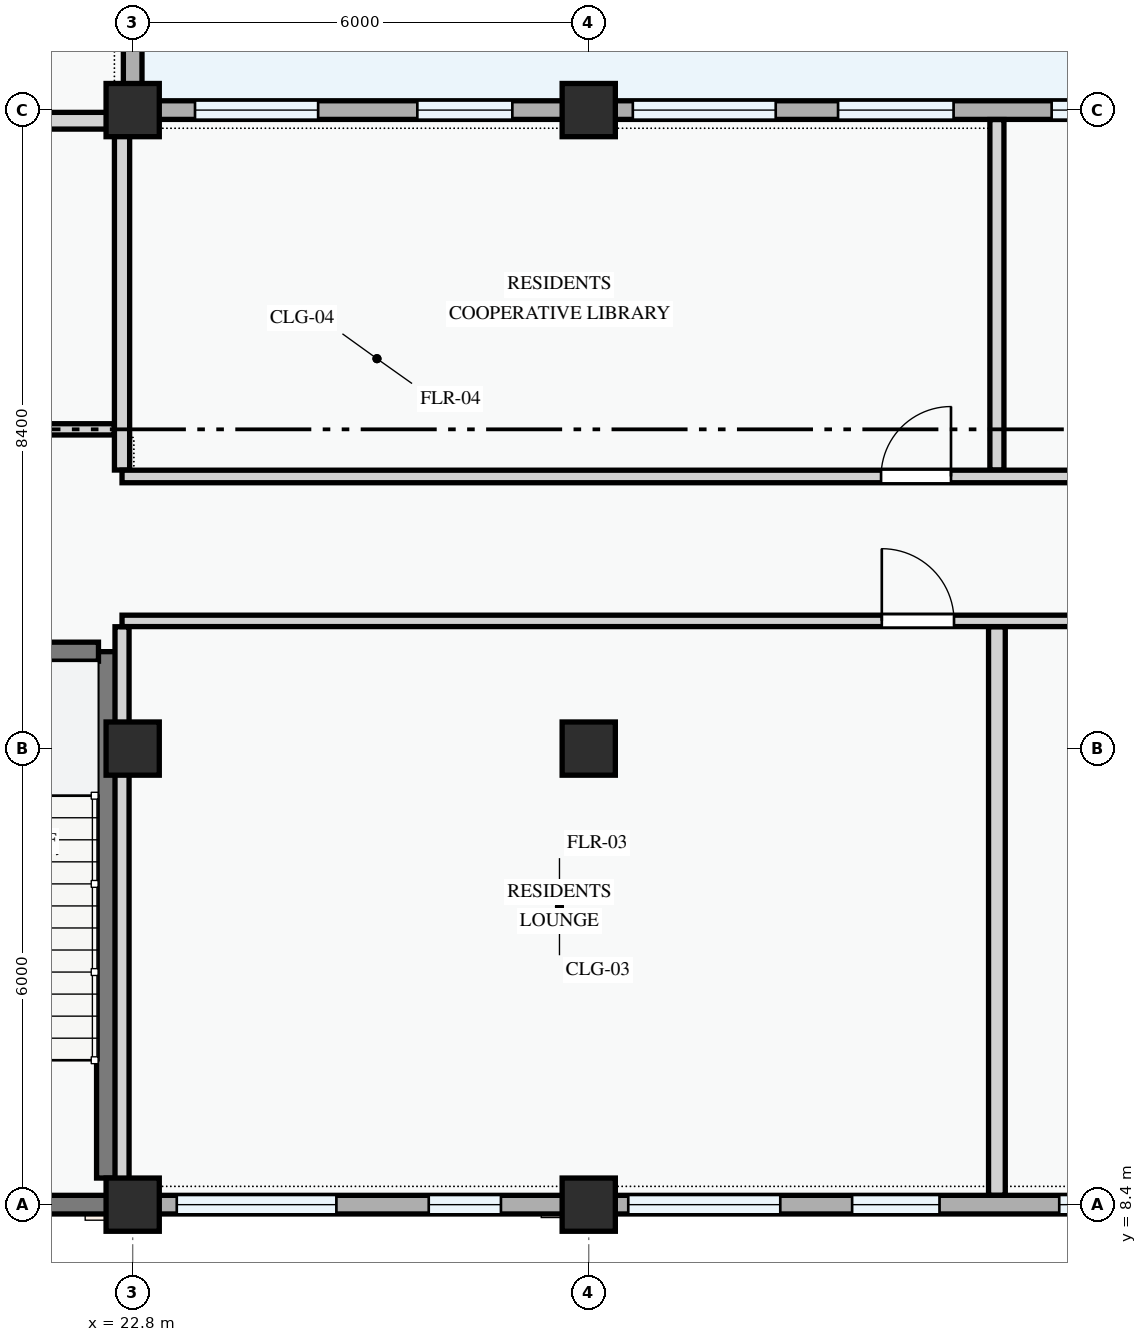
"""IFC4 building model, lengths in metres.
Left out: names, types, materials, properties, quantities, classifications, styles, units other than length and angle.
Written with IfcOpenShell. Run it as: python <this file> out.ifc"""

import sys

from ifc_helpers import new_model, si_unit, direction, frame, frame_2d, origin, origin_2d, place, context, subcontext, project, spatial, rectangle, extrude, element, fill, save


model = new_model("IFC4")
c1 = context("Model", 3, precision=1e-05, world=origin(), true_north=direction((0.0, 1.0)))
c2 = subcontext(c1, "Body", "Model", "MODEL_VIEW")
j1 = project(units=[si_unit("LENGTHUNIT", "METRE"), si_unit("PLANEANGLEUNIT", "RADIAN")], contexts=[c1])
p1 = place(None, origin())
s1 = spatial("IfcSite", under=j1, at=p1, CompositionType="ELEMENT")
p2 = place(p1, origin())
s2 = spatial("IfcBuilding", under=s1, at=p2, CompositionType="ELEMENT")
p3 = place(p2, origin())
s3 = spatial("IfcBuildingStorey", under=s2, at=p3, CompositionType="ELEMENT", Elevation=0.0)
for number, where, z_axis, x_axis in (
    (1, (22.8, 8.4, 0.0), (0.0, 0.0, 1.0), (1.0, 0.0, 0.0)),
    (2, (22.8, 14.4, 0.0), (0.0, 0.0, 1.0), (1.0, 0.0, 0.0)),
    (3, (22.8, 22.8, 0.0), (0.0, 0.0, 1.0), (1.0, 0.0, 0.0)),
    (4, (28.8, 8.4, 0.0), (0.0, 0.0, 1.0), (1.0, 0.0, 0.0)),
    (5, (28.8, 14.4, 0.0), (0.0, 0.0, 1.0), (1.0, 0.0, 0.0)),
    (6, (28.8, 22.8, 0.0), (0.0, 0.0, 1.0), (1.0, 0.0, 0.0)),
):
    element("IfcColumn", number, at=place(p3, frame(where, z_axis=z_axis, x_axis=x_axis)), inside=s3, PredefinedType="COLUMN", context=c2, shape_type="SweptSolid", body=[
        extrude(rectangle(XDim=0.7, YDim=0.7, at=origin_2d()), origin(), (0.0, 0.0, 1.0), 4.5),
    ])
p4 = place(p3, frame((22.8, 22.8, 0.0), z_axis=(0.0, 0.0, 1.0), x_axis=(0.0, 1.0, 0.0)))
e7 = element("IfcWall", 7, at=p4, inside=s3, PredefinedType="STANDARD", context=c2, shape_type="SweptSolid", body=[
    extrude(rectangle(XDim=6.0, YDim=0.245, at=frame_2d((3.0, 0.0))), origin(), (0.0, 0.0, 1.0), 3.585),
])
p5 = place(p4, frame((0.88, 0.0, 0.78)))
e8 = element("IfcOpeningElement", 8, at=p5, cuts=e7, PredefinedType="OPENING", context=c2, shape_type="SweptSolid", body=[
    extrude(rectangle(XDim=1.5, YDim=1.5, at=frame_2d((0.75, 0.75))), frame((0.0, 0.133, 0.0), z_axis=(0.0, -1.0, 0.0), x_axis=(1.0, 0.0, 0.0)), (0.0, 0.0, 1.0), 0.265),
])
p6 = place(p4, frame((3.495, 0.0, 0.78)))
e9 = element("IfcOpeningElement", 9, at=p6, cuts=e7, PredefinedType="OPENING", context=c2, shape_type="SweptSolid", body=[
    extrude(rectangle(XDim=1.75, YDim=1.45, at=frame_2d((0.875, 0.725))), frame((0.0, 0.133, 0.0), z_axis=(0.0, -1.0, 0.0), x_axis=(1.0, 0.0, 0.0)), (0.0, 0.0, 1.0), 0.265),
])
p7 = place(p3, frame((14.4, 8.4, 0.0), z_axis=(0.0, 0.0, 1.0), x_axis=(1.0, 0.0, 0.0)))
e10 = element("IfcWall", 10, at=p7, inside=s3, PredefinedType="STANDARD", context=c2, shape_type="SweptSolid", body=[
    extrude(rectangle(XDim=8.4, YDim=0.245, at=frame_2d((4.2, 0.0))), origin(), (0.0, 0.0, 1.0), 4.2),
])
p8 = place(p7, frame((0.4, 0.0, 0.0)))
e11 = element("IfcOpeningElement", 11, at=p8, cuts=e10, PredefinedType="OPENING", context=c2, shape_type="SweptSolid", body=[
    extrude(rectangle(XDim=1.6, YDim=2.35, at=frame_2d((0.8, 1.175))), frame((0.0, 0.133, 0.0), z_axis=(0.0, -1.0, 0.0), x_axis=(1.0, 0.0, 0.0)), (0.0, 0.0, 1.0), 0.265),
])
p9 = place(p7, frame((5.85, 0.0, 0.0)))
e12 = element("IfcOpeningElement", 12, at=p9, cuts=e10, PredefinedType="OPENING", context=c2, shape_type="SweptSolid", body=[
    extrude(rectangle(XDim=1.3, YDim=2.2, at=frame_2d((0.65, 1.1))), frame((0.0, 0.133, 0.0), z_axis=(0.0, -1.0, 0.0), x_axis=(1.0, 0.0, 0.0)), (0.0, 0.0, 1.0), 0.265),
])
p10 = place(p3, frame((22.8, 8.4, 0.0), z_axis=(0.0, 0.0, 1.0), x_axis=(1.0, 0.0, 0.0)))
e13 = element("IfcWall", 13, at=p10, inside=s3, PredefinedType="STANDARD", context=c2, shape_type="SweptSolid", body=[
    extrude(rectangle(XDim=6.0, YDim=0.245, at=frame_2d((3.0, 0.0))), origin(), (0.0, 0.0, 1.0), 3.585),
])
p11 = place(p10, frame((0.58, 0.0, 0.78)))
e14 = element("IfcOpeningElement", 14, at=p11, cuts=e13, PredefinedType="OPENING", context=c2, shape_type="SweptSolid", body=[
    extrude(rectangle(XDim=2.1, YDim=1.55, at=frame_2d((1.05, 0.775))), frame((0.0, 0.133, 0.0), z_axis=(0.0, -1.0, 0.0), x_axis=(1.0, 0.0, 0.0)), (0.0, 0.0, 1.0), 0.265),
])
p12 = place(p10, frame((3.895, 0.0, 0.78)))
e15 = element("IfcOpeningElement", 15, at=p12, cuts=e13, PredefinedType="OPENING", context=c2, shape_type="SweptSolid", body=[
    extrude(rectangle(XDim=0.95, YDim=1.15, at=frame_2d((0.475, 0.575))), frame((0.0, 0.133, 0.0), z_axis=(0.0, -1.0, 0.0), x_axis=(1.0, 0.0, 0.0)), (0.0, 0.0, 1.0), 0.265),
])
p13 = place(p3, frame((28.8, 8.4, 0.0), z_axis=(0.0, 0.0, 1.0), x_axis=(1.0, 0.0, 0.0)))
e16 = element("IfcWall", 16, at=p13, inside=s3, PredefinedType="STANDARD", context=c2, shape_type="SweptSolid", body=[
    extrude(rectangle(XDim=8.4, YDim=0.245, at=frame_2d((4.2, 0.0))), origin(), (0.0, 0.0, 1.0), 3.485),
])
p14 = place(p13, frame((0.52, 0.0, 0.78)))
e17 = element("IfcOpeningElement", 17, at=p14, cuts=e16, PredefinedType="OPENING", context=c2, shape_type="SweptSolid", body=[
    extrude(rectangle(XDim=2.0, YDim=1.5, at=frame_2d((1.0, 0.75))), frame((0.0, 0.133, 0.0), z_axis=(0.0, -1.0, 0.0), x_axis=(1.0, 0.0, 0.0)), (0.0, 0.0, 1.0), 0.265),
])
p15 = place(p13, frame((3.465, 0.0, 0.78)))
e18 = element("IfcOpeningElement", 18, at=p15, cuts=e16, PredefinedType="OPENING", context=c2, shape_type="SweptSolid", body=[
    extrude(rectangle(XDim=1.15, YDim=1.25, at=frame_2d((0.575, 0.625))), frame((0.0, 0.133, 0.0), z_axis=(0.0, -1.0, 0.0), x_axis=(1.0, 0.0, 0.0)), (0.0, 0.0, 1.0), 0.265),
])
p16 = place(p13, frame((6.19, 0.0, 0.78)))
e19 = element("IfcOpeningElement", 19, at=p16, cuts=e16, PredefinedType="OPENING", context=c2, shape_type="SweptSolid", body=[
    extrude(rectangle(XDim=1.2, YDim=1.35, at=frame_2d((0.6, 0.675))), frame((0.0, 0.133, 0.0), z_axis=(0.0, -1.0, 0.0), x_axis=(1.0, 0.0, 0.0)), (0.0, 0.0, 1.0), 0.265),
])
p17 = place(p3, frame((37.2, 22.8, 0.0), z_axis=(0.0, 0.0, 1.0), x_axis=(-1.0, 0.0, 0.0)))
e20 = element("IfcWall", 20, at=p17, inside=s3, PredefinedType="STANDARD", context=c2, shape_type="SweptSolid", body=[
    extrude(rectangle(XDim=8.4, YDim=0.245, at=frame_2d((4.2, 0.0))), origin(), (0.0, 0.0, 1.0), 3.485),
])
p18 = place(p17, frame((0.91, 0.0, 0.78)))
e21 = element("IfcOpeningElement", 21, at=p18, cuts=e20, PredefinedType="OPENING", context=c2, shape_type="SweptSolid", body=[
    extrude(rectangle(XDim=1.4, YDim=1.45, at=frame_2d((0.7, 0.725))), frame((0.0, 0.133, 0.0), z_axis=(0.0, -1.0, 0.0), x_axis=(1.0, 0.0, 0.0)), (0.0, 0.0, 1.0), 0.265),
])
p19 = place(p17, frame((3.6, 0.0, 0.78)))
e22 = element("IfcOpeningElement", 22, at=p19, cuts=e20, PredefinedType="OPENING", context=c2, shape_type="SweptSolid", body=[
    extrude(rectangle(XDim=1.52, YDim=1.42, at=frame_2d((0.76, 0.71))), frame((0.0, 0.133, 0.0), z_axis=(0.0, -1.0, 0.0), x_axis=(1.0, 0.0, 0.0)), (0.0, 0.0, 1.0), 0.265),
])
p20 = place(p17, frame((5.94, 0.0, 0.78)))
e23 = element("IfcOpeningElement", 23, at=p20, cuts=e20, PredefinedType="OPENING", context=c2, shape_type="SweptSolid", body=[
    extrude(rectangle(XDim=1.88, YDim=1.52, at=frame_2d((0.94, 0.76))), frame((0.0, 0.133, 0.0), z_axis=(0.0, -1.0, 0.0), x_axis=(1.0, 0.0, 0.0)), (0.0, 0.0, 1.0), 0.265),
])
p21 = place(p3, frame((28.8, 22.8, 0.0), z_axis=(0.0, 0.0, 1.0), x_axis=(-1.0, 0.0, 0.0)))
e24 = element("IfcWall", 24, at=p21, inside=s3, PredefinedType="STANDARD", context=c2, shape_type="SweptSolid", body=[
    extrude(rectangle(XDim=6.0, YDim=0.245, at=frame_2d((3.0, 0.0))), origin(), (0.0, 0.0, 1.0), 3.585),
])
p22 = place(p21, frame((1.005, 0.0, 0.78)))
e25 = element("IfcOpeningElement", 25, at=p22, cuts=e24, PredefinedType="OPENING", context=c2, shape_type="SweptSolid", body=[
    extrude(rectangle(XDim=1.25, YDim=1.45, at=frame_2d((0.625, 0.725))), frame((0.0, 0.133, 0.0), z_axis=(0.0, -1.0, 0.0), x_axis=(1.0, 0.0, 0.0)), (0.0, 0.0, 1.0), 0.265),
])
p23 = place(p21, frame((3.56, 0.0, 0.78)))
e26 = element("IfcOpeningElement", 26, at=p23, cuts=e24, PredefinedType="OPENING", context=c2, shape_type="SweptSolid", body=[
    extrude(rectangle(XDim=1.62, YDim=1.38, at=frame_2d((0.81, 0.69))), frame((0.0, 0.133, 0.0), z_axis=(0.0, -1.0, 0.0), x_axis=(1.0, 0.0, 0.0)), (0.0, 0.0, 1.0), 0.265),
])
p24 = place(p3, frame((22.475, 8.75, 0.0), z_axis=(0.0, 0.0, 1.0), x_axis=(0.0, 1.0, 0.0)))
e27 = element("IfcWall", 27, at=p24, inside=s3, PredefinedType="SHEAR", context=c2, shape_type="SweptSolid", body=[
    extrude(rectangle(XDim=6.925, YDim=0.3, at=frame_2d((3.462, 0.0))), origin(), (0.0, 0.0, 1.0), 4.2),
])
p25 = place(p3, frame((8.85, 15.675, 0.0), z_axis=(0.0, 0.0, 1.0), x_axis=(1.0, 0.0, 0.0)))
e28 = element("IfcWall", 28, at=p25, inside=s3, PredefinedType="SHEAR", context=c2, shape_type="SweptSolid", body=[
    extrude(rectangle(XDim=13.5, YDim=0.25, at=frame_2d((6.75, 0.0))), origin(), (0.0, 0.0, 1.0), 4.2),
])
p26 = place(p25, frame((6.2, 0.0, 0.0)))
e29 = element("IfcOpeningElement", 29, at=p26, cuts=e28, PredefinedType="OPENING", context=c2, shape_type="SweptSolid", body=[
    extrude(rectangle(XDim=1.1, YDim=2.15, at=frame_2d((0.55, 1.075))), frame((0.0, 0.135, 0.0), z_axis=(0.0, -1.0, 0.0), x_axis=(1.0, 0.0, 0.0)), (0.0, 0.0, 1.0), 0.27),
])
p27 = place(p3, frame((18.025, 18.6, 0.0), z_axis=(0.0, 0.0, 1.0), x_axis=(1.0, 0.0, 0.0)))
e30 = element("IfcWall", 30, at=p27, inside=s3, PredefinedType="PARTITIONING", context=c2, shape_type="SweptSolid", body=[
    extrude(rectangle(XDim=4.533, YDim=0.148, at=frame_2d((2.267, 0.0))), origin(), (0.0, 0.0, 1.0), 4.2),
])
p28 = place(p27, frame((1.65, 0.0, 0.0)))
e31 = element("IfcOpeningElement", 31, at=p28, cuts=e30, PredefinedType="OPENING", context=c2, shape_type="SweptSolid", body=[
    extrude(rectangle(XDim=1.0, YDim=2.15, at=frame_2d((0.5, 1.075))), frame((0.0, 0.084, 0.0), z_axis=(0.0, -1.0, 0.0), x_axis=(1.0, 0.0, 0.0)), (0.0, 0.0, 1.0), 0.168),
])
p29 = place(p3, frame((18.064, 22.66, 0.0), z_axis=(0.0, 0.0, 1.0), x_axis=(1.0, 0.0, 0.0)))
e32 = element("IfcWall", 32, at=p29, inside=s3, PredefinedType="PARTITIONING", context=c2, shape_type="SweptSolid", body=[
    extrude(rectangle(XDim=4.494, YDim=0.22, at=frame_2d((2.247, 0.0))), origin(), (0.0, 0.0, 1.0), 3.485),
])
p30 = place(p3, frame((22.66, 8.524, 0.0), z_axis=(0.0, 0.0, 1.0), x_axis=(0.0, 1.0, 0.0)))
e33 = element("IfcWall", 33, at=p30, inside=s3, PredefinedType="PARTITIONING", context=c2, shape_type="SweptSolid", body=[
    extrude(rectangle(XDim=7.479, YDim=0.185, at=frame_2d((3.739, 0.0))), origin(), (0.0, 0.0, 1.0), 3.485),
])
p31 = place(p3, frame((22.66, 18.064, 0.0), z_axis=(0.0, 0.0, 1.0), x_axis=(0.0, 1.0, 0.0)))
e34 = element("IfcWall", 34, at=p31, inside=s3, PredefinedType="PARTITIONING", context=c2, shape_type="SweptSolid", body=[
    extrude(rectangle(XDim=4.676, YDim=0.2, at=frame_2d((2.338, 0.0))), origin(), (0.0, 0.0, 1.0), 3.485),
])
p32 = place(p3, frame((34.17, 8.524, 0.0), z_axis=(0.0, 0.0, 1.0), x_axis=(0.0, 1.0, 0.0)))
e35 = element("IfcWall", 35, at=p32, inside=s3, PredefinedType="PARTITIONING", context=c2, shape_type="SweptSolid", body=[
    extrude(rectangle(XDim=7.479, YDim=0.22, at=frame_2d((3.739, 0.0))), origin(), (0.0, 0.0, 1.0), 4.2),
])
p33 = place(p3, frame((34.17, 18.064, 0.0), z_axis=(0.0, 0.0, 1.0), x_axis=(0.0, 1.0, 0.0)))
e36 = element("IfcWall", 36, at=p33, inside=s3, PredefinedType="PARTITIONING", context=c2, shape_type="SweptSolid", body=[
    extrude(rectangle(XDim=4.611, YDim=0.185, at=frame_2d((2.306, 0.0))), origin(), (0.0, 0.0, 1.0), 4.2),
])
p34 = place(p3, frame((22.66, 16.08, 0.0), z_axis=(0.0, 0.0, 1.0), x_axis=(1.0, 0.0, 0.0)))
e37 = element("IfcWall", 37, at=p34, inside=s3, PredefinedType="PARTITIONING", context=c2, shape_type="SweptSolid", body=[
    extrude(rectangle(XDim=34.816, YDim=0.15, at=frame_2d((17.408, 0.0))), origin(), (0.0, 0.0, 1.0), 4.2),
])
p35 = place(p34, frame((9.996, 0.0, 0.0)))
e38 = element("IfcOpeningElement", 38, at=p35, cuts=e37, PredefinedType="OPENING", context=c2, shape_type="SweptSolid", body=[
    extrude(rectangle(XDim=0.95, YDim=2.1, at=frame_2d((0.475, 1.05))), frame((0.0, 0.085, 0.0), z_axis=(0.0, -1.0, 0.0), x_axis=(1.0, 0.0, 0.0)), (0.0, 0.0, 1.0), 0.17),
])
p36 = place(p34, frame((16.965, 0.0, 0.0)))
e39 = element("IfcOpeningElement", 39, at=p36, cuts=e37, PredefinedType="OPENING", context=c2, shape_type="SweptSolid", body=[
    extrude(rectangle(XDim=0.95, YDim=2.1, at=frame_2d((0.475, 1.05))), frame((0.0, 0.085, 0.0), z_axis=(0.0, -1.0, 0.0), x_axis=(1.0, 0.0, 0.0)), (0.0, 0.0, 1.0), 0.17),
])
p37 = place(p34, frame((24.249, 0.0, 0.0)))
e40 = element("IfcOpeningElement", 40, at=p37, cuts=e37, PredefinedType="OPENING", context=c2, shape_type="SweptSolid", body=[
    extrude(rectangle(XDim=0.95, YDim=2.1, at=frame_2d((0.475, 1.05))), frame((0.0, 0.085, 0.0), z_axis=(0.0, -1.0, 0.0), x_axis=(1.0, 0.0, 0.0)), (0.0, 0.0, 1.0), 0.17),
])
p38 = place(p3, frame((22.66, 17.98, 0.0), z_axis=(0.0, 0.0, 1.0), x_axis=(1.0, 0.0, 0.0)))
e41 = element("IfcWall", 41, at=p38, inside=s3, PredefinedType="PARTITIONING", context=c2, shape_type="SweptSolid", body=[
    extrude(rectangle(XDim=34.816, YDim=0.165, at=frame_2d((17.408, 0.0))), origin(), (0.0, 0.0, 1.0), 4.2),
])
p39 = place(p38, frame((9.986, 0.0, 0.0)))
e42 = element("IfcOpeningElement", 42, at=p39, cuts=e41, PredefinedType="OPENING", context=c2, shape_type="SweptSolid", body=[
    extrude(rectangle(XDim=0.92, YDim=2.1, at=frame_2d((0.46, 1.05))), frame((0.0, 0.093, 0.0), z_axis=(0.0, -1.0, 0.0), x_axis=(1.0, 0.0, 0.0)), (0.0, 0.0, 1.0), 0.185),
])
p40 = place(p38, frame((16.96, 0.0, 0.0)))
e43 = element("IfcOpeningElement", 43, at=p40, cuts=e41, PredefinedType="OPENING", context=c2, shape_type="SweptSolid", body=[
    extrude(rectangle(XDim=0.92, YDim=2.1, at=frame_2d((0.46, 1.05))), frame((0.0, 0.093, 0.0), z_axis=(0.0, -1.0, 0.0), x_axis=(1.0, 0.0, 0.0)), (0.0, 0.0, 1.0), 0.185),
])
p41 = place(p38, frame((24.248, 0.0, 0.0)))
e44 = element("IfcOpeningElement", 44, at=p41, cuts=e41, PredefinedType="OPENING", context=c2, shape_type="SweptSolid", body=[
    extrude(rectangle(XDim=0.96, YDim=2.12, at=frame_2d((0.48, 1.06))), frame((0.0, 0.093, 0.0), z_axis=(0.0, -1.0, 0.0), x_axis=(1.0, 0.0, 0.0)), (0.0, 0.0, 1.0), 0.185),
])
p42 = place(p11, origin())
e45 = element("IfcWindow", 45, at=p42, inside=s3, PartitioningType="DOUBLE_PANEL_VERTICAL", PredefinedType="WINDOW", context=c2, shape_type="SweptSolid", body=[
    extrude(rectangle(XDim=2.1, YDim=1.55, at=frame_2d((1.05, 0.775))), frame((0.0, 0.03, 0.0), z_axis=(0.0, -1.0, 0.0), x_axis=(1.0, 0.0, 0.0)), (0.0, 0.0, 1.0), 0.06),
])
fill(e14, e45)
p43 = place(p12, origin())
e46 = element("IfcWindow", 46, at=p43, inside=s3, PartitioningType="SINGLE_PANEL", PredefinedType="WINDOW", context=c2, shape_type="SweptSolid", body=[
    extrude(rectangle(XDim=0.95, YDim=1.15, at=frame_2d((0.475, 0.575))), frame((0.0, 0.03, 0.0), z_axis=(0.0, -1.0, 0.0), x_axis=(1.0, 0.0, 0.0)), (0.0, 0.0, 1.0), 0.06),
])
fill(e15, e46)
p44 = place(p14, origin())
e47 = element("IfcWindow", 47, at=p44, inside=s3, PartitioningType="DOUBLE_PANEL_VERTICAL", PredefinedType="WINDOW", context=c2, shape_type="SweptSolid", body=[
    extrude(rectangle(XDim=2.0, YDim=1.5, at=frame_2d((1.0, 0.75))), frame((0.0, 0.03, 0.0), z_axis=(0.0, -1.0, 0.0), x_axis=(1.0, 0.0, 0.0)), (0.0, 0.0, 1.0), 0.06),
])
fill(e17, e47)
p45 = place(p15, origin())
e48 = element("IfcWindow", 48, at=p45, inside=s3, PartitioningType="SINGLE_PANEL", PredefinedType="WINDOW", context=c2, shape_type="SweptSolid", body=[
    extrude(rectangle(XDim=1.15, YDim=1.25, at=frame_2d((0.575, 0.625))), frame((0.0, 0.03, 0.0), z_axis=(0.0, -1.0, 0.0), x_axis=(1.0, 0.0, 0.0)), (0.0, 0.0, 1.0), 0.06),
])
fill(e18, e48)
p46 = place(p16, origin())
e49 = element("IfcWindow", 49, at=p46, inside=s3, PartitioningType="SINGLE_PANEL", PredefinedType="WINDOW", context=c2, shape_type="SweptSolid", body=[
    extrude(rectangle(XDim=1.2, YDim=1.35, at=frame_2d((0.6, 0.675))), frame((0.0, 0.03, 0.0), z_axis=(0.0, -1.0, 0.0), x_axis=(1.0, 0.0, 0.0)), (0.0, 0.0, 1.0), 0.06),
])
fill(e19, e49)
p47 = place(p18, origin())
e50 = element("IfcWindow", 50, at=p47, inside=s3, PartitioningType="SINGLE_PANEL", PredefinedType="WINDOW", context=c2, shape_type="SweptSolid", body=[
    extrude(rectangle(XDim=1.4, YDim=1.45, at=frame_2d((0.7, 0.725))), frame((0.0, 0.03, 0.0), z_axis=(0.0, -1.0, 0.0), x_axis=(1.0, 0.0, 0.0)), (0.0, 0.0, 1.0), 0.06),
])
fill(e21, e50)
p48 = place(p19, origin())
e51 = element("IfcWindow", 51, at=p48, inside=s3, PartitioningType="SINGLE_PANEL", PredefinedType="WINDOW", context=c2, shape_type="SweptSolid", body=[
    extrude(rectangle(XDim=1.52, YDim=1.42, at=frame_2d((0.76, 0.71))), frame((0.0, 0.03, 0.0), z_axis=(0.0, -1.0, 0.0), x_axis=(1.0, 0.0, 0.0)), (0.0, 0.0, 1.0), 0.06),
])
fill(e22, e51)
p49 = place(p20, origin())
e52 = element("IfcWindow", 52, at=p49, inside=s3, PartitioningType="DOUBLE_PANEL_VERTICAL", PredefinedType="WINDOW", context=c2, shape_type="SweptSolid", body=[
    extrude(rectangle(XDim=1.88, YDim=1.52, at=frame_2d((0.94, 0.76))), frame((0.0, 0.03, 0.0), z_axis=(0.0, -1.0, 0.0), x_axis=(1.0, 0.0, 0.0)), (0.0, 0.0, 1.0), 0.06),
])
fill(e23, e52)
p50 = place(p22, origin())
e53 = element("IfcWindow", 53, at=p50, inside=s3, PartitioningType="SINGLE_PANEL", PredefinedType="WINDOW", context=c2, shape_type="SweptSolid", body=[
    extrude(rectangle(XDim=1.25, YDim=1.45, at=frame_2d((0.625, 0.725))), frame((0.0, 0.03, 0.0), z_axis=(0.0, -1.0, 0.0), x_axis=(1.0, 0.0, 0.0)), (0.0, 0.0, 1.0), 0.06),
])
fill(e25, e53)
p51 = place(p23, origin())
e54 = element("IfcWindow", 54, at=p51, inside=s3, PartitioningType="DOUBLE_PANEL_VERTICAL", PredefinedType="WINDOW", context=c2, shape_type="SweptSolid", body=[
    extrude(rectangle(XDim=1.62, YDim=1.38, at=frame_2d((0.81, 0.69))), frame((0.0, 0.03, 0.0), z_axis=(0.0, -1.0, 0.0), x_axis=(1.0, 0.0, 0.0)), (0.0, 0.0, 1.0), 0.06),
])
fill(e26, e54)
p52 = place(p35, origin())
e55 = element("IfcDoor", 55, at=p52, inside=s3, OperationType="SINGLE_SWING_LEFT", PredefinedType="DOOR", context=c2, shape_type="SweptSolid", body=[
    extrude(rectangle(XDim=0.95, YDim=2.1, at=frame_2d((0.475, 1.05))), frame((0.0, 0.025, 0.0), z_axis=(0.0, -1.0, 0.0), x_axis=(1.0, 0.0, 0.0)), (0.0, 0.0, 1.0), 0.05),
])
fill(e38, e55)
p53 = place(p39, origin())
e56 = element("IfcDoor", 56, at=p53, inside=s3, OperationType="SINGLE_SWING_RIGHT", PredefinedType="DOOR", context=c2, shape_type="SweptSolid", body=[
    extrude(rectangle(XDim=0.92, YDim=2.1, at=frame_2d((0.46, 1.05))), frame((0.0, 0.025, 0.0), z_axis=(0.0, -1.0, 0.0), x_axis=(1.0, 0.0, 0.0)), (0.0, 0.0, 1.0), 0.05),
])
fill(e42, e56)
save(model, sys.argv[1])
